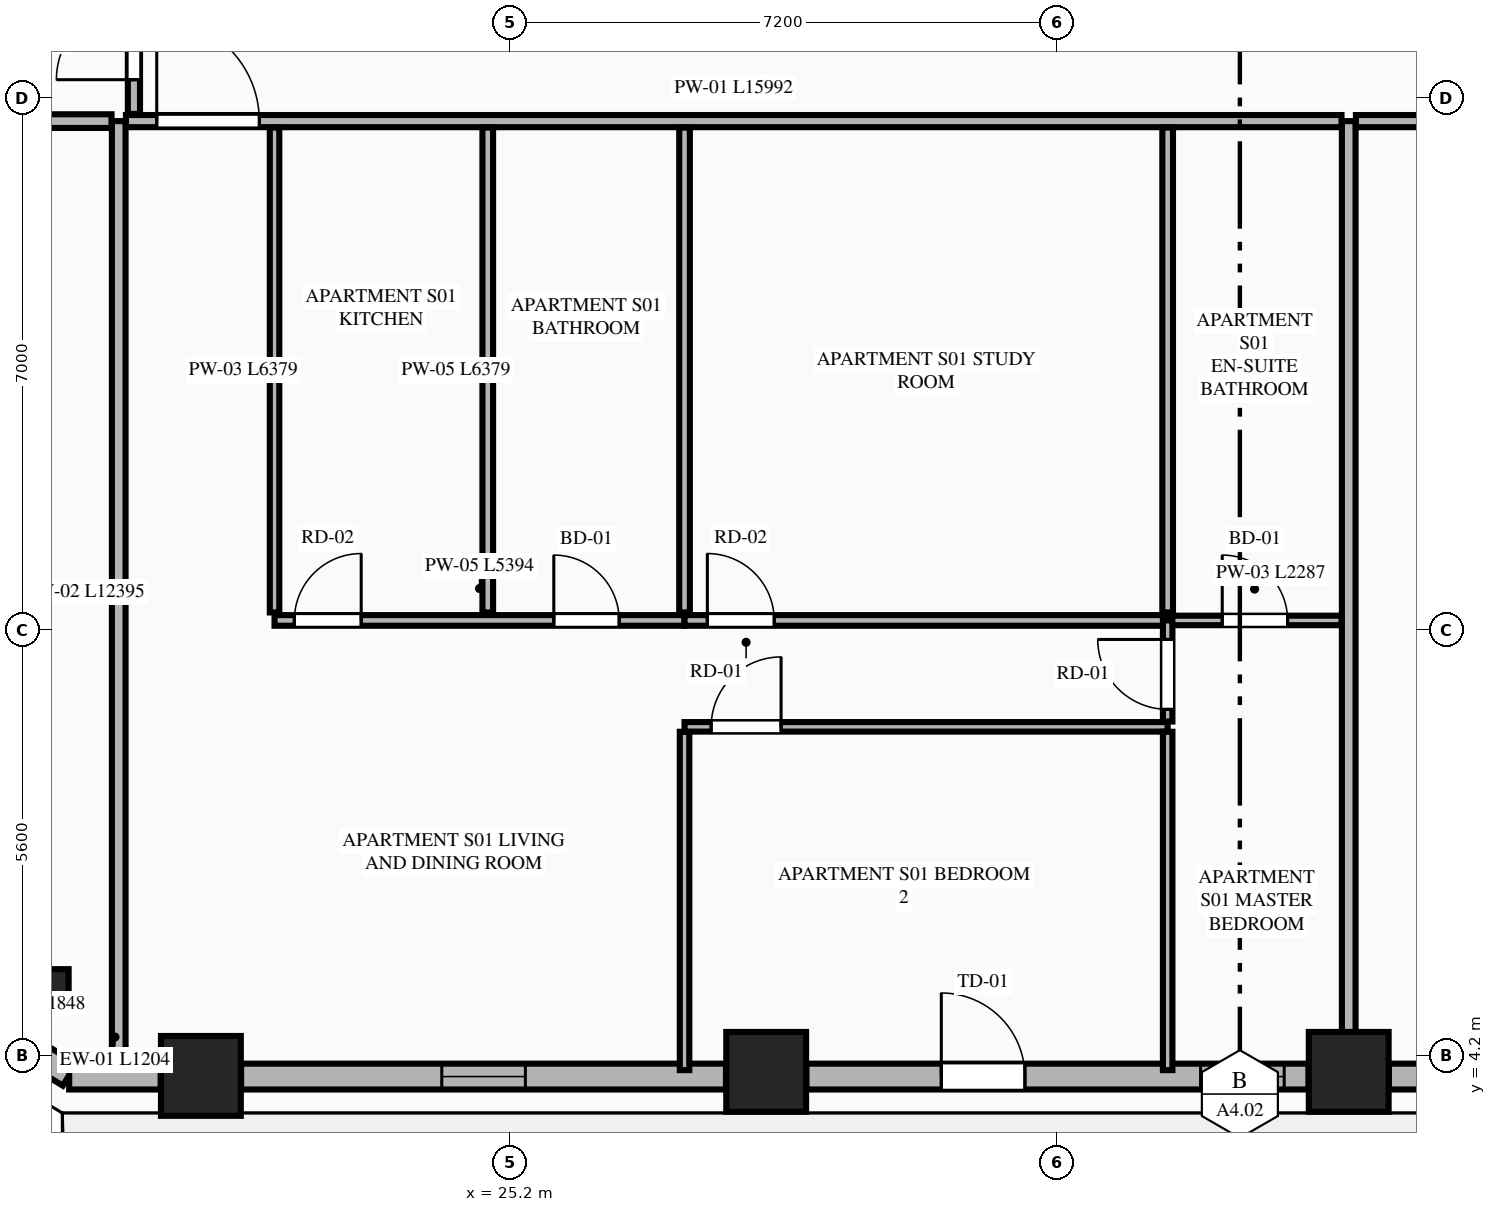
"""IFC4 building model, lengths in metres.
Left out: names, types, materials, properties, quantities, classifications, styles, units other than length and angle.
Written with IfcOpenShell. Run it as: python <this file> out.ifc"""

import sys

from ifc_helpers import new_model, si_unit, direction, frame, frame_2d, origin, origin_2d, place, context, subcontext, project, spatial, rectangle, extrude, element, fill, save


model = new_model("IFC4")
c1 = context("Model", 3, precision=1e-05, world=origin(), true_north=direction((0.0, 1.0)))
c2 = subcontext(c1, "Body", "Model", "MODEL_VIEW")
j1 = project(units=[si_unit("LENGTHUNIT", "METRE"), si_unit("PLANEANGLEUNIT", "RADIAN")], contexts=[c1])
p1 = place(None, origin())
s1 = spatial("IfcSite", under=j1, at=p1, CompositionType="ELEMENT")
p2 = place(p1, origin())
s2 = spatial("IfcBuilding", under=s1, at=p2, CompositionType="ELEMENT")
p3 = place(p2, frame((0.0, 0.0, 109.05)))
s3 = spatial("IfcBuildingStorey", under=s2, at=p3, CompositionType="ELEMENT", Elevation=109.05)
for number, where, z_axis, x_axis in (
    (1, (21.131, 3.939, 0.0), (0.0, 0.0, 1.0), (1.0, 0.0, 0.0)),
    (2, (28.568, 3.992, 0.0), (0.0, 0.0, 1.0), (1.0, 0.0, 0.0)),
    (3, (36.232, 3.992, 0.0), (0.0, 0.0, 1.0), (1.0, 0.0, 0.0)),
):
    element("IfcColumn", number, at=place(p3, frame(where, z_axis=z_axis, x_axis=x_axis)), inside=s3, PredefinedType="COLUMN", context=c2, shape_type="SweptSolid", body=[
        extrude(rectangle(XDim=1.05, YDim=1.05, at=origin_2d()), origin(), (0.0, 0.0, 1.0), 3.55),
    ])
p4 = place(p3, frame((19.141, 5.093, 0.0), z_axis=(0.0, 0.0, 1.0), x_axis=(0.865160173452, -0.501495637342, 0.0)))
e4 = element("IfcColumn", 4, at=p4, inside=s3, PredefinedType="PILASTER", context=c2, shape_type="SweptSolid", body=[
    extrude(rectangle(XDim=0.5, YDim=0.35, at=origin_2d()), origin(), (0.0, 0.0, 1.0), 3.55),
])
p5 = place(p3, frame((17.829, 4.923, 0.0), z_axis=(0.0, 0.0, 1.0), x_axis=(0.851798915137, -0.523868884523, 0.0)))
e5 = element("IfcWall", 5, at=p5, inside=s3, PredefinedType="STANDARD", context=c2, shape_type="SweptSolid", body=[
    extrude(rectangle(XDim=1.848, YDim=0.34, at=frame_2d((0.924, 0.0))), origin(), (0.0, 0.0, 1.0), 3.34),
])
p6 = place(p3, frame((19.398, 3.93, 0.0), z_axis=(0.0, 0.0, 1.0), x_axis=(1.0, 0.0, 0.0)))
e6 = element("IfcWall", 6, at=p6, inside=s3, PredefinedType="STANDARD", context=c2, shape_type="SweptSolid", body=[
    extrude(rectangle(XDim=1.204, YDim=0.34, at=frame_2d((0.602, 0.0))), origin(), (0.0, 0.0, 1.0), 3.34),
])
p7 = place(p3, frame((21.66, 3.93, 0.0), z_axis=(0.0, 0.0, 1.0), x_axis=(1.0, 0.0, 0.0)))
e7 = element("IfcWall", 7, at=p7, inside=s3, PredefinedType="STANDARD", context=c2, shape_type="SweptSolid", body=[
    extrude(rectangle(XDim=6.379, YDim=0.34, at=frame_2d((3.189, 0.0))), origin(), (0.0, 0.0, 1.0), 2.797),
])
p8 = place(p7, frame((2.64, 0.0, 0.75)))
e8 = element("IfcOpeningElement", 8, at=p8, cuts=e7, PredefinedType="OPENING", context=c2, shape_type="SweptSolid", body=[
    extrude(rectangle(XDim=1.1, YDim=1.897, at=frame_2d((0.55, 0.948))), frame((0.0, 0.18, 0.0), z_axis=(0.0, -1.0, 0.0), x_axis=(1.0, 0.0, 0.0)), (0.0, 0.0, 1.0), 0.36),
])
p9 = place(p3, frame((29.097, 3.93, 0.0), z_axis=(0.0, 0.0, 1.0), x_axis=(1.0, 0.0, 0.0)))
e9 = element("IfcWall", 9, at=p9, inside=s3, PredefinedType="STANDARD", context=c2, shape_type="SweptSolid", body=[
    extrude(rectangle(XDim=6.606, YDim=0.34, at=frame_2d((3.303, 0.0))), origin(), (0.0, 0.0, 1.0), 2.797),
])
p10 = place(p9, frame((1.775, 0.0, 0.0)))
e10 = element("IfcOpeningElement", 10, at=p10, cuts=e9, PredefinedType="OPENING", context=c2, shape_type="SweptSolid", body=[
    extrude(rectangle(XDim=1.1, YDim=2.25, at=frame_2d((0.55, 1.125))), frame((0.0, 0.18, 0.0), z_axis=(0.0, -1.0, 0.0), x_axis=(1.0, 0.0, 0.0)), (0.0, 0.0, 1.0), 0.36),
])
p11 = place(p9, frame((5.186, 0.0, 0.75)))
e11 = element("IfcOpeningElement", 11, at=p11, cuts=e9, PredefinedType="OPENING", context=c2, shape_type="SweptSolid", body=[
    extrude(rectangle(XDim=1.1, YDim=1.897, at=frame_2d((0.55, 0.948))), frame((0.0, 0.18, 0.0), z_axis=(0.0, -1.0, 0.0), x_axis=(1.0, 0.0, 0.0)), (0.0, 0.0, 1.0), 0.36),
])
p12 = place(p3, frame((36.761, 3.93, 0.0), z_axis=(0.0, 0.0, 1.0), x_axis=(1.0, 0.0, 0.0)))
e12 = element("IfcWall", 12, at=p12, inside=s3, PredefinedType="STANDARD", context=c2, shape_type="SweptSolid", body=[
    extrude(rectangle(XDim=6.379, YDim=0.34, at=frame_2d((3.189, 0.0))), origin(), (0.0, 0.0, 1.0), 2.797),
])
p13 = place(p12, frame((2.639, 0.0, 0.75)))
e13 = element("IfcOpeningElement", 13, at=p13, cuts=e12, PredefinedType="OPENING", context=c2, shape_type="SweptSolid", body=[
    extrude(rectangle(XDim=1.1, YDim=1.897, at=frame_2d((0.55, 0.948))), frame((0.0, 0.18, 0.0), z_axis=(0.0, -1.0, 0.0), x_axis=(1.0, 0.0, 0.0)), (0.0, 0.0, 1.0), 0.36),
])
p14 = place(p3, frame((20.05, 4.105, 0.0), z_axis=(0.0, 0.0, 1.0), x_axis=(0.0, 1.0, 0.0)))
e14 = element("IfcWall", 14, at=p14, inside=s3, PredefinedType="PARTITIONING", context=c2, shape_type="SweptSolid", body=[
    extrude(rectangle(XDim=12.395, YDim=0.18, at=frame_2d((6.198, 0.0))), origin(), (0.0, 0.0, 1.0), 3.34),
])
p15 = place(p3, frame((36.232, 4.105, 0.0), z_axis=(0.0, 0.0, 1.0), x_axis=(0.0, 1.0, 0.0)))
e15 = element("IfcWall", 15, at=p15, inside=s3, PredefinedType="PARTITIONING", context=c2, shape_type="SweptSolid", body=[
    extrude(rectangle(XDim=12.395, YDim=0.18, at=frame_2d((6.198, 0.0))), origin(), (0.0, 0.0, 1.0), 2.722),
])
p16 = place(p3, frame((20.145, 16.5, 0.0), z_axis=(0.0, 0.0, 1.0), x_axis=(1.0, 0.0, 0.0)))
e16 = element("IfcWall", 16, at=p16, inside=s3, PredefinedType="PARTITIONING", context=c2, shape_type="SweptSolid", body=[
    extrude(rectangle(XDim=15.992, YDim=0.16, at=frame_2d((7.996, 0.0))), origin(), (0.0, 0.0, 1.0), 3.34),
])
p17 = place(p16, frame((0.405, 0.0, 0.0)))
e17 = element("IfcOpeningElement", 17, at=p17, cuts=e16, PredefinedType="OPENING", context=c2, shape_type="SweptSolid", body=[
    extrude(rectangle(XDim=1.35, YDim=2.35, at=frame_2d((0.675, 1.175))), frame((0.0, 0.09, 0.0), z_axis=(0.0, -1.0, 0.0), x_axis=(1.0, 0.0, 0.0)), (0.0, 0.0, 1.0), 0.18),
])
p18 = place(p3, frame((22.1, 10.036, 0.0), z_axis=(0.0, 0.0, 1.0), x_axis=(0.0, 1.0, 0.0)))
e18 = element("IfcWall", 18, at=p18, inside=s3, PredefinedType="PARTITIONING", context=c2, shape_type="SweptSolid", body=[
    extrude(rectangle(XDim=6.379, YDim=0.125, at=frame_2d((3.189, 0.0))), origin(), (0.0, 0.0, 1.0), 2.722),
])
p19 = place(p3, frame((22.1, 9.931, 0.0), z_axis=(0.0, 0.0, 1.0), x_axis=(1.0, 0.0, 0.0)))
e19 = element("IfcWall", 19, at=p19, inside=s3, PredefinedType="PLUMBINGWALL", context=c2, shape_type="SweptSolid", body=[
    extrude(rectangle(XDim=5.394, YDim=0.14, at=frame_2d((2.697, 0.0))), origin(), (0.0, 0.0, 1.0), 3.34),
])
p20 = place(p19, frame((3.674, 0.0, 0.0)))
e20 = element("IfcOpeningElement", 20, at=p20, cuts=e19, PredefinedType="OPENING", context=c2, shape_type="SweptSolid", body=[
    extrude(rectangle(XDim=0.86, YDim=2.1, at=frame_2d((0.43, 1.05))), frame((0.0, 0.08, 0.0), z_axis=(0.0, -1.0, 0.0), x_axis=(1.0, 0.0, 0.0)), (0.0, 0.0, 1.0), 0.16),
])
p21 = place(p19, frame((0.26, 0.0, 0.0)))
e21 = element("IfcOpeningElement", 21, at=p21, cuts=e19, PredefinedType="OPENING", context=c2, shape_type="SweptSolid", body=[
    extrude(rectangle(XDim=0.88, YDim=2.15, at=frame_2d((0.44, 1.075))), frame((0.0, 0.08, 0.0), z_axis=(0.0, -1.0, 0.0), x_axis=(1.0, 0.0, 0.0)), (0.0, 0.0, 1.0), 0.16),
])
p22 = place(p3, frame((27.494, 9.931, 0.0), z_axis=(0.0, 0.0, 1.0), x_axis=(1.0, 0.0, 0.0)))
e22 = element("IfcWall", 22, at=p22, inside=s3, PredefinedType="PLUMBINGWALL", context=c2, shape_type="SweptSolid", body=[
    extrude(rectangle(XDim=6.356, YDim=0.14, at=frame_2d((3.178, 0.0))), origin(), (0.0, 0.0, 1.0), 3.34),
])
p23 = place(p22, frame((0.3, 0.0, 0.0)))
e23 = element("IfcOpeningElement", 23, at=p23, cuts=e22, PredefinedType="OPENING", context=c2, shape_type="SweptSolid", body=[
    extrude(rectangle(XDim=0.88, YDim=2.15, at=frame_2d((0.44, 1.075))), frame((0.0, 0.08, 0.0), z_axis=(0.0, -1.0, 0.0), x_axis=(1.0, 0.0, 0.0)), (0.0, 0.0, 1.0), 0.16),
])
p24 = place(p3, frame((33.85, 9.931, 0.0), z_axis=(0.0, 0.0, 1.0), x_axis=(1.0, 0.0, 0.0)))
e24 = element("IfcWall", 24, at=p24, inside=s3, PredefinedType="PARTITIONING", context=c2, shape_type="SweptSolid", body=[
    extrude(rectangle(XDim=2.287, YDim=0.125, at=frame_2d((1.144, 0.0))), origin(), (0.0, 0.0, 1.0), 3.34),
])
p25 = place(p24, frame((0.718, 0.0, 0.0)))
e25 = element("IfcOpeningElement", 25, at=p25, cuts=e24, PredefinedType="OPENING", context=c2, shape_type="SweptSolid", body=[
    extrude(rectangle(XDim=0.86, YDim=2.1, at=frame_2d((0.43, 1.05))), frame((0.0, 0.073, 0.0), z_axis=(0.0, -1.0, 0.0), x_axis=(1.0, 0.0, 0.0)), (0.0, 0.0, 1.0), 0.145),
])
p26 = place(p3, frame((24.905, 10.036, 0.0), z_axis=(0.0, 0.0, 1.0), x_axis=(0.0, 1.0, 0.0)))
e26 = element("IfcWall", 26, at=p26, inside=s3, PredefinedType="PLUMBINGWALL", context=c2, shape_type="SweptSolid", body=[
    extrude(rectangle(XDim=6.379, YDim=0.14, at=frame_2d((3.189, 0.0))), origin(), (0.0, 0.0, 1.0), 3.34),
])
p27 = place(p3, frame((27.494, 4.015, 0.0), z_axis=(0.0, 0.0, 1.0), x_axis=(0.0, 1.0, 0.0)))
e27 = element("IfcWall", 27, at=p27, inside=s3, PredefinedType="PARTITIONING", context=c2, shape_type="SweptSolid", body=[
    extrude(rectangle(XDim=4.451, YDim=0.125, at=frame_2d((2.226, 0.0))), origin(), (0.0, 0.0, 1.0), 3.34),
])
p28 = place(p3, frame((27.494, 8.531, 0.0), z_axis=(0.0, 0.0, 1.0), x_axis=(1.0, 0.0, 0.0)))
e28 = element("IfcWall", 28, at=p28, inside=s3, PredefinedType="PARTITIONING", context=c2, shape_type="SweptSolid", body=[
    extrude(rectangle(XDim=6.356, YDim=0.125, at=frame_2d((3.178, 0.0))), origin(), (0.0, 0.0, 1.0), 3.34),
])
p29 = place(p28, frame((0.35, 0.0, 0.0)))
e29 = element("IfcOpeningElement", 29, at=p29, cuts=e28, PredefinedType="OPENING", context=c2, shape_type="SweptSolid", body=[
    extrude(rectangle(XDim=0.92, YDim=2.15, at=frame_2d((0.46, 1.075))), frame((0.0, 0.073, 0.0), z_axis=(0.0, -1.0, 0.0), x_axis=(1.0, 0.0, 0.0)), (0.0, 0.0, 1.0), 0.145),
])
p30 = place(p3, frame((33.85, 8.601, 0.0), z_axis=(0.0, 0.0, 1.0), x_axis=(0.0, 1.0, 0.0)))
e30 = element("IfcWall", 30, at=p30, inside=s3, PredefinedType="PARTITIONING", context=c2, shape_type="SweptSolid", body=[
    extrude(rectangle(XDim=1.33, YDim=0.125, at=frame_2d((0.665, 0.0))), origin(), (0.0, 0.0, 1.0), 3.34),
])
p31 = place(p30, frame((0.16, 0.0, 0.0)))
e31 = element("IfcOpeningElement", 31, at=p31, cuts=e30, PredefinedType="OPENING", context=c2, shape_type="SweptSolid", body=[
    extrude(rectangle(XDim=0.92, YDim=2.15, at=frame_2d((0.46, 1.075))), frame((0.0, 0.073, 0.0), z_axis=(0.0, -1.0, 0.0), x_axis=(1.0, 0.0, 0.0)), (0.0, 0.0, 1.0), 0.145),
])
for number, where, z_axis, x_axis in (
    (32, (27.494, 10.036, 0.0), (0.0, 0.0, 1.0), (0.0, 1.0, 0.0)),
    (33, (33.85, 10.036, 0.0), (0.0, 0.0, 1.0), (0.0, 1.0, 0.0)),
):
    element("IfcWall", number, at=place(p3, frame(where, z_axis=z_axis, x_axis=x_axis)), inside=s3, PredefinedType="PLUMBINGWALL", context=c2, shape_type="SweptSolid", body=[
        extrude(rectangle(XDim=6.379, YDim=0.14, at=frame_2d((3.189, 0.0))), origin(), (0.0, 0.0, 1.0), 3.34),
    ])
p32 = place(p3, frame((33.85, 4.015, 0.0), z_axis=(0.0, 0.0, 1.0), x_axis=(0.0, 1.0, 0.0)))
e34 = element("IfcWall", 34, at=p32, inside=s3, PredefinedType="PARTITIONING", context=c2, shape_type="SweptSolid", body=[
    extrude(rectangle(XDim=4.451, YDim=0.125, at=frame_2d((2.226, 0.0))), origin(), (0.0, 0.0, 1.0), 3.34),
])
p33 = place(p3, frame((36.327, 16.5, 0.0), z_axis=(0.0, 0.0, 1.0), x_axis=(1.0, 0.0, 0.0)))
e35 = element("IfcWall", 35, at=p33, inside=s3, PredefinedType="PARTITIONING", context=c2, shape_type="SweptSolid", body=[
    extrude(rectangle(XDim=8.328, YDim=0.16, at=frame_2d((4.164, 0.0))), origin(), (0.0, 0.0, 1.0), 3.34),
])
p34 = place(p33, frame((6.073, 0.0, 0.0)))
e36 = element("IfcOpeningElement", 36, at=p34, cuts=e35, PredefinedType="OPENING", context=c2, shape_type="SweptSolid", body=[
    extrude(rectangle(XDim=1.02, YDim=2.25, at=frame_2d((0.51, 1.125))), frame((0.0, 0.09, 0.0), z_axis=(0.0, -1.0, 0.0), x_axis=(1.0, 0.0, 0.0)), (0.0, 0.0, 1.0), 0.18),
])
p35 = place(p3, frame((12.185, 16.5, 0.0), z_axis=(0.0, 0.0, 1.0), x_axis=(1.0, 0.0, 0.0)))
e37 = element("IfcWall", 37, at=p35, inside=s3, PredefinedType="PARTITIONING", context=c2, shape_type="SweptSolid", body=[
    extrude(rectangle(XDim=7.77, YDim=0.18, at=frame_2d((3.885, 0.0))), origin(), (0.0, 0.0, 1.0), 3.34),
])
p36 = place(p3, frame((20.25, 16.595, 0.0), z_axis=(0.0, 0.0, 1.0), x_axis=(0.0, 1.0, 0.0)))
e38 = element("IfcWall", 38, at=p36, inside=s3, PredefinedType="PARTITIONING", context=c2, shape_type="SweptSolid", body=[
    extrude(rectangle(XDim=18.61, YDim=0.16, at=frame_2d((9.305, 0.0))), origin(), (0.0, 0.0, 1.0), 3.34),
])
p37 = place(p36, frame((0.45, 0.0, 0.0)))
e39 = element("IfcOpeningElement", 39, at=p37, cuts=e38, PredefinedType="OPENING", context=c2, shape_type="SweptSolid", body=[
    extrude(rectangle(XDim=1.02, YDim=2.25, at=frame_2d((0.51, 1.125))), frame((0.0, 0.09, 0.0), z_axis=(0.0, -1.0, 0.0), x_axis=(1.0, 0.0, 0.0)), (0.0, 0.0, 1.0), 0.18),
])
p38 = place(p8, origin())
e40 = element("IfcWindow", 40, at=p38, inside=s3, PartitioningType="SINGLE_PANEL", PredefinedType="WINDOW", context=c2, shape_type="SweptSolid", body=[
    extrude(rectangle(XDim=1.1, YDim=1.897, at=frame_2d((0.55, 0.948))), frame((0.0, 0.03, 0.0), z_axis=(0.0, -1.0, 0.0), x_axis=(1.0, 0.0, 0.0)), (0.0, 0.0, 1.0), 0.06),
])
fill(e8, e40)
p39 = place(p10, origin())
e41 = element("IfcDoor", 41, at=p39, inside=s3, OperationType="SINGLE_SWING_LEFT", PredefinedType="DOOR", context=c2, shape_type="SweptSolid", body=[
    extrude(rectangle(XDim=1.1, YDim=2.25, at=frame_2d((0.55, 1.125))), frame((0.0, 0.025, 0.0), z_axis=(0.0, -1.0, 0.0), x_axis=(1.0, 0.0, 0.0)), (0.0, 0.0, 1.0), 0.05),
])
fill(e10, e41)
p40 = place(p20, origin())
e42 = element("IfcDoor", 42, at=p40, inside=s3, OperationType="SINGLE_SWING_LEFT", PredefinedType="DOOR", context=c2, shape_type="SweptSolid", body=[
    extrude(rectangle(XDim=0.86, YDim=2.1, at=frame_2d((0.43, 1.05))), frame((0.0, 0.025, 0.0), z_axis=(0.0, -1.0, 0.0), x_axis=(1.0, 0.0, 0.0)), (0.0, 0.0, 1.0), 0.05),
])
fill(e20, e42)
p41 = place(p25, origin())
e43 = element("IfcDoor", 43, at=p41, inside=s3, OperationType="SINGLE_SWING_LEFT", PredefinedType="DOOR", context=c2, shape_type="SweptSolid", body=[
    extrude(rectangle(XDim=0.86, YDim=2.1, at=frame_2d((0.43, 1.05))), frame((0.0, 0.025, 0.0), z_axis=(0.0, -1.0, 0.0), x_axis=(1.0, 0.0, 0.0)), (0.0, 0.0, 1.0), 0.05),
])
fill(e25, e43)
p42 = place(p17, origin())
e44 = element("IfcDoor", 44, at=p42, inside=s3, OperationType="SINGLE_SWING_LEFT", PredefinedType="DOOR", context=c2, shape_type="SweptSolid", body=[
    extrude(rectangle(XDim=1.35, YDim=2.35, at=frame_2d((0.675, 1.175))), frame((0.0, 0.025, 0.0), z_axis=(0.0, -1.0, 0.0), x_axis=(1.0, 0.0, 0.0)), (0.0, 0.0, 1.0), 0.05),
])
fill(e17, e44)
p43 = place(p21, origin())
e45 = element("IfcDoor", 45, at=p43, inside=s3, OperationType="SINGLE_SWING_RIGHT", PredefinedType="DOOR", context=c2, shape_type="SweptSolid", body=[
    extrude(rectangle(XDim=0.88, YDim=2.15, at=frame_2d((0.44, 1.075))), frame((0.0, 0.025, 0.0), z_axis=(0.0, -1.0, 0.0), x_axis=(1.0, 0.0, 0.0)), (0.0, 0.0, 1.0), 0.05),
])
fill(e21, e45)
p44 = place(p23, origin())
e46 = element("IfcDoor", 46, at=p44, inside=s3, OperationType="SINGLE_SWING_LEFT", PredefinedType="DOOR", context=c2, shape_type="SweptSolid", body=[
    extrude(rectangle(XDim=0.88, YDim=2.15, at=frame_2d((0.44, 1.075))), frame((0.0, 0.025, 0.0), z_axis=(0.0, -1.0, 0.0), x_axis=(1.0, 0.0, 0.0)), (0.0, 0.0, 1.0), 0.05),
])
fill(e23, e46)
p45 = place(p29, origin())
e47 = element("IfcDoor", 47, at=p45, inside=s3, OperationType="SINGLE_SWING_RIGHT", PredefinedType="DOOR", context=c2, shape_type="SweptSolid", body=[
    extrude(rectangle(XDim=0.92, YDim=2.15, at=frame_2d((0.46, 1.075))), frame((0.0, 0.025, 0.0), z_axis=(0.0, -1.0, 0.0), x_axis=(1.0, 0.0, 0.0)), (0.0, 0.0, 1.0), 0.05),
])
fill(e29, e47)
p46 = place(p31, origin())
e48 = element("IfcDoor", 48, at=p46, inside=s3, OperationType="SINGLE_SWING_RIGHT", PredefinedType="DOOR", context=c2, shape_type="SweptSolid", body=[
    extrude(rectangle(XDim=0.92, YDim=2.15, at=frame_2d((0.46, 1.075))), frame((0.0, 0.025, 0.0), z_axis=(0.0, -1.0, 0.0), x_axis=(1.0, 0.0, 0.0)), (0.0, 0.0, 1.0), 0.05),
])
fill(e31, e48)
p47 = place(p37, origin())
e49 = element("IfcDoor", 49, at=p47, inside=s3, OperationType="SINGLE_SWING_LEFT", PredefinedType="DOOR", context=c2, shape_type="SweptSolid", body=[
    extrude(rectangle(XDim=1.02, YDim=2.25, at=frame_2d((0.51, 1.125))), frame((0.0, 0.025, 0.0), z_axis=(0.0, -1.0, 0.0), x_axis=(1.0, 0.0, 0.0)), (0.0, 0.0, 1.0), 0.05),
])
fill(e39, e49)
p48 = place(p11, origin())
e50 = element("IfcWindow", 50, at=p48, inside=s3, PartitioningType="SINGLE_PANEL", PredefinedType="WINDOW", context=c2, shape_type="SweptSolid", body=[
    extrude(rectangle(XDim=1.1, YDim=1.897, at=frame_2d((0.55, 0.948))), frame((0.0, 0.03, 0.0), z_axis=(0.0, -1.0, 0.0), x_axis=(1.0, 0.0, 0.0)), (0.0, 0.0, 1.0), 0.06),
])
fill(e11, e50)
save(model, sys.argv[1])
